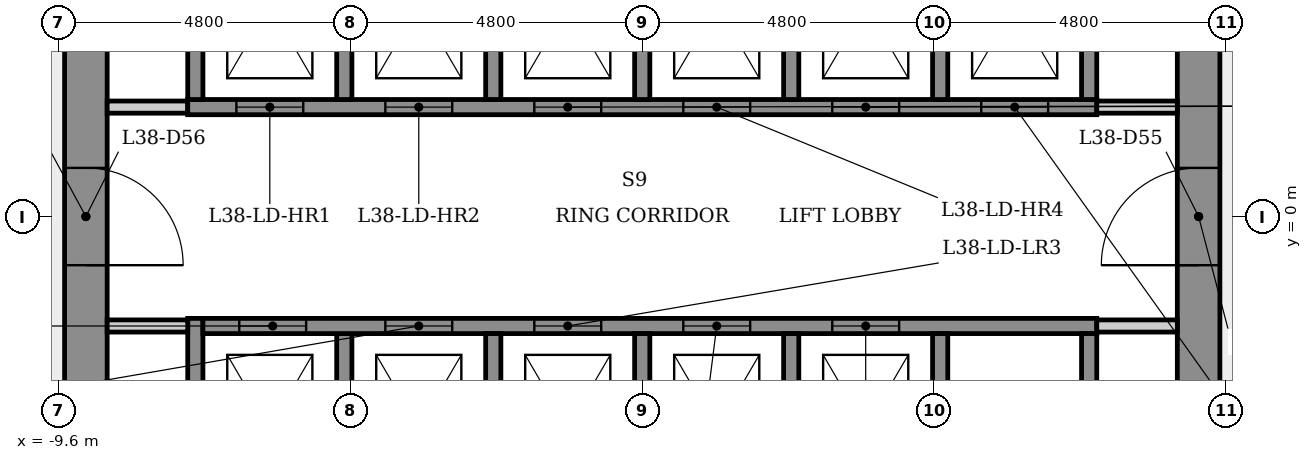
"""IFC4 building model, lengths in metres.
Left out: names, types, materials, properties, quantities, classifications, styles, units other than length and angle.
Written with IfcOpenShell. Run it as: python <this file> out.ifc"""

import sys

from ifc_helpers import new_model, si_unit, direction, frame, frame_2d, origin, place, context, subcontext, project, spatial, rectangle, extrude, element, fill, save


model = new_model("IFC4")
c1 = context("Model", 3, precision=1e-05, world=origin(), true_north=direction((0.0, 1.0)))
c2 = subcontext(c1, "Body", "Model", "MODEL_VIEW")
j1 = project(units=[si_unit("LENGTHUNIT", "METRE"), si_unit("PLANEANGLEUNIT", "RADIAN")], contexts=[c1])
p1 = place(None, origin())
s1 = spatial("IfcSite", under=j1, at=p1, CompositionType="ELEMENT")
p2 = place(p1, origin())
s2 = spatial("IfcBuilding", under=s1, at=p2, CompositionType="ELEMENT")
p3 = place(p2, frame((0.0, 0.0, 143.9)))
s3 = spatial("IfcBuildingStorey", under=s2, at=p3, CompositionType="ELEMENT", Elevation=143.9)
p4 = place(p3, frame((9.15, -5.485, 0.0), z_axis=(0.0, 0.0, 1.0), x_axis=(0.0, 1.0, 0.0)))
e1 = element("IfcWall", 1, at=p4, inside=s3, PredefinedType="SHEAR", context=c2, shape_type="SweptSolid", body=[
    extrude(rectangle(XDim=10.97, YDim=0.7, at=frame_2d((5.485, 0.0))), origin(), (0.0, 0.0, 1.0), 4.0),
])
p5 = place(p4, frame((4.685, 0.0, 0.0)))
e2 = element("IfcOpeningElement", 2, at=p5, cuts=e1, PredefinedType="OPENING", context=c2, shape_type="SweptSolid", body=[
    extrude(rectangle(XDim=1.6, YDim=2.1, at=frame_2d((0.8, 1.05))), frame((0.0, 0.36, 0.0), z_axis=(0.0, -1.0, 0.0), x_axis=(1.0, 0.0, 0.0)), (0.0, 0.0, 1.0), 0.72),
])
p6 = place(p3, frame((-9.15, 5.485, 0.0), z_axis=(0.0, 0.0, 1.0), x_axis=(0.0, -1.0, 0.0)))
e3 = element("IfcWall", 3, at=p6, inside=s3, PredefinedType="SHEAR", context=c2, shape_type="SweptSolid", body=[
    extrude(rectangle(XDim=10.97, YDim=0.7, at=frame_2d((5.485, 0.0))), origin(), (0.0, 0.0, 1.0), 4.0),
])
p7 = place(p6, frame((4.685, 0.0, 0.0)))
e4 = element("IfcOpeningElement", 4, at=p7, cuts=e3, PredefinedType="OPENING", context=c2, shape_type="SweptSolid", body=[
    extrude(rectangle(XDim=1.6, YDim=2.1, at=frame_2d((0.8, 1.05))), frame((0.0, 0.36, 0.0), z_axis=(0.0, -1.0, 0.0), x_axis=(1.0, 0.0, 0.0)), (0.0, 0.0, 1.0), 0.72),
])
p8 = place(p3, frame((-8.8, 1.8, 0.0), z_axis=(0.0, 0.0, 1.0), x_axis=(1.0, 0.0, 0.0)))
e5 = element("IfcWall", 5, at=p8, inside=s3, PredefinedType="PARTITIONING", context=c2, shape_type="SweptSolid", body=[
    extrude(rectangle(XDim=1.325, YDim=0.2, at=frame_2d((0.663, 0.0))), origin(), (0.0, 0.0, 1.0), 3.6),
])
p9 = place(p3, frame((-7.475, 1.8, 0.0), z_axis=(0.0, 0.0, 1.0), x_axis=(1.0, 0.0, 0.0)))
e6 = element("IfcWall", 6, at=p9, inside=s3, PredefinedType="SHEAR", context=c2, shape_type="SweptSolid", body=[
    extrude(rectangle(XDim=14.95, YDim=0.25, at=frame_2d((7.475, 0.0))), origin(), (0.0, 0.0, 1.0), 3.6),
])
p10 = place(p9, frame((0.8, 0.0, 0.0)))
e7 = element("IfcOpeningElement", 7, at=p10, cuts=e6, PredefinedType="OPENING", context=c2, shape_type="SweptSolid", body=[
    extrude(rectangle(XDim=1.1, YDim=2.1, at=frame_2d((0.55, 1.05))), frame((0.0, 0.135, 0.0), z_axis=(0.0, -1.0, 0.0), x_axis=(1.0, 0.0, 0.0)), (0.0, 0.0, 1.0), 0.27),
])
p11 = place(p9, frame((3.25, 0.0, 0.0)))
e8 = element("IfcOpeningElement", 8, at=p11, cuts=e6, PredefinedType="OPENING", context=c2, shape_type="SweptSolid", body=[
    extrude(rectangle(XDim=1.1, YDim=2.1, at=frame_2d((0.55, 1.05))), frame((0.0, 0.135, 0.0), z_axis=(0.0, -1.0, 0.0), x_axis=(1.0, 0.0, 0.0)), (0.0, 0.0, 1.0), 0.27),
])
p12 = place(p9, frame((5.7, 0.0, 0.0)))
e9 = element("IfcOpeningElement", 9, at=p12, cuts=e6, PredefinedType="OPENING", context=c2, shape_type="SweptSolid", body=[
    extrude(rectangle(XDim=1.1, YDim=2.1, at=frame_2d((0.55, 1.05))), frame((0.0, 0.135, 0.0), z_axis=(0.0, -1.0, 0.0), x_axis=(1.0, 0.0, 0.0)), (0.0, 0.0, 1.0), 0.27),
])
p13 = place(p9, frame((8.15, 0.0, 0.0)))
e10 = element("IfcOpeningElement", 10, at=p13, cuts=e6, PredefinedType="OPENING", context=c2, shape_type="SweptSolid", body=[
    extrude(rectangle(XDim=1.1, YDim=2.1, at=frame_2d((0.55, 1.05))), frame((0.0, 0.135, 0.0), z_axis=(0.0, -1.0, 0.0), x_axis=(1.0, 0.0, 0.0)), (0.0, 0.0, 1.0), 0.27),
])
p14 = place(p9, frame((10.6, 0.0, 0.0)))
e11 = element("IfcOpeningElement", 11, at=p14, cuts=e6, PredefinedType="OPENING", context=c2, shape_type="SweptSolid", body=[
    extrude(rectangle(XDim=1.1, YDim=2.1, at=frame_2d((0.55, 1.05))), frame((0.0, 0.135, 0.0), z_axis=(0.0, -1.0, 0.0), x_axis=(1.0, 0.0, 0.0)), (0.0, 0.0, 1.0), 0.27),
])
p15 = place(p9, frame((13.05, 0.0, 0.0)))
e12 = element("IfcOpeningElement", 12, at=p15, cuts=e6, PredefinedType="OPENING", context=c2, shape_type="SweptSolid", body=[
    extrude(rectangle(XDim=1.1, YDim=2.1, at=frame_2d((0.55, 1.05))), frame((0.0, 0.135, 0.0), z_axis=(0.0, -1.0, 0.0), x_axis=(1.0, 0.0, 0.0)), (0.0, 0.0, 1.0), 0.27),
])
p16 = place(p3, frame((-7.35, -5.846, 0.0), z_axis=(0.0, 0.0, 1.0), x_axis=(0.0, 1.0, 0.0)))
e13 = element("IfcWall", 13, at=p16, inside=s3, PredefinedType="SHEAR", context=c2, shape_type="SweptSolid", body=[
    extrude(rectangle(XDim=4.171, YDim=0.25, at=frame_2d((2.085, 0.0))), origin(), (0.0, 0.0, 1.0), 3.6),
])
p17 = place(p3, frame((-7.35, 1.925, 0.0), z_axis=(0.0, 0.0, 1.0), x_axis=(0.0, 1.0, 0.0)))
e14 = element("IfcWall", 14, at=p17, inside=s3, PredefinedType="SHEAR", context=c2, shape_type="SweptSolid", body=[
    extrude(rectangle(XDim=3.921, YDim=0.25, at=frame_2d((1.96, 0.0))), origin(), (0.0, 0.0, 1.0), 3.6),
])
p18 = place(p3, frame((-7.475, -1.8, 0.0), z_axis=(0.0, 0.0, 1.0), x_axis=(-1.0, 0.0, 0.0)))
e15 = element("IfcWall", 15, at=p18, inside=s3, PredefinedType="PARTITIONING", context=c2, shape_type="SweptSolid", body=[
    extrude(rectangle(XDim=1.325, YDim=0.2, at=frame_2d((0.663, 0.0))), origin(), (0.0, 0.0, 1.0), 3.6),
])
for number, where, z_axis, x_axis in (
    (16, (-4.9, -1.925, 0.0), (0.0, 0.0, 1.0), (0.0, -1.0, 0.0)),
    (17, (-4.9, 5.025, 0.0), (0.0, 0.0, 1.0), (0.0, -1.0, 0.0)),
):
    element("IfcWall", number, at=place(p3, frame(where, z_axis=z_axis, x_axis=x_axis)), inside=s3, PredefinedType="SHEAR", context=c2, shape_type="SweptSolid", body=[
        extrude(rectangle(XDim=3.1, YDim=0.25, at=frame_2d((1.55, 0.0))), origin(), (0.0, 0.0, 1.0), 4.0),
    ])
p19 = place(p3, frame((-7.225, -1.8, 0.0), z_axis=(0.0, 0.0, 1.0), x_axis=(1.0, 0.0, 0.0)))
e18 = element("IfcWall", 18, at=p19, inside=s3, PredefinedType="SHEAR", context=c2, shape_type="SweptSolid", body=[
    extrude(rectangle(XDim=14.7, YDim=0.25, at=frame_2d((7.35, 0.0))), origin(), (0.0, 0.0, 1.0), 3.6),
])
p20 = place(p19, frame((0.597, 0.0, 0.0)))
e19 = element("IfcOpeningElement", 19, at=p20, cuts=e18, PredefinedType="OPENING", context=c2, shape_type="SweptSolid", body=[
    extrude(rectangle(XDim=1.1, YDim=2.1, at=frame_2d((0.55, 1.05))), frame((0.0, 0.135, 0.0), z_axis=(0.0, -1.0, 0.0), x_axis=(1.0, 0.0, 0.0)), (0.0, 0.0, 1.0), 0.27),
])
p21 = place(p19, frame((3.0, 0.0, 0.0)))
e20 = element("IfcOpeningElement", 20, at=p21, cuts=e18, PredefinedType="OPENING", context=c2, shape_type="SweptSolid", body=[
    extrude(rectangle(XDim=1.1, YDim=2.1, at=frame_2d((0.55, 1.05))), frame((0.0, 0.135, 0.0), z_axis=(0.0, -1.0, 0.0), x_axis=(1.0, 0.0, 0.0)), (0.0, 0.0, 1.0), 0.27),
])
p22 = place(p19, frame((5.45, 0.0, 0.0)))
e21 = element("IfcOpeningElement", 21, at=p22, cuts=e18, PredefinedType="OPENING", context=c2, shape_type="SweptSolid", body=[
    extrude(rectangle(XDim=1.1, YDim=2.1, at=frame_2d((0.55, 1.05))), frame((0.0, 0.135, 0.0), z_axis=(0.0, -1.0, 0.0), x_axis=(1.0, 0.0, 0.0)), (0.0, 0.0, 1.0), 0.27),
])
p23 = place(p19, frame((7.9, 0.0, 0.0)))
e22 = element("IfcOpeningElement", 22, at=p23, cuts=e18, PredefinedType="OPENING", context=c2, shape_type="SweptSolid", body=[
    extrude(rectangle(XDim=1.1, YDim=2.1, at=frame_2d((0.55, 1.05))), frame((0.0, 0.135, 0.0), z_axis=(0.0, -1.0, 0.0), x_axis=(1.0, 0.0, 0.0)), (0.0, 0.0, 1.0), 0.27),
])
p24 = place(p19, frame((10.35, 0.0, 0.0)))
e23 = element("IfcOpeningElement", 23, at=p24, cuts=e18, PredefinedType="OPENING", context=c2, shape_type="SweptSolid", body=[
    extrude(rectangle(XDim=1.1, YDim=2.1, at=frame_2d((0.55, 1.05))), frame((0.0, 0.135, 0.0), z_axis=(0.0, -1.0, 0.0), x_axis=(1.0, 0.0, 0.0)), (0.0, 0.0, 1.0), 0.27),
])
for number, where, z_axis, x_axis in (
    (24, (-2.45, -1.925, 0.0), (0.0, 0.0, 1.0), (0.0, -1.0, 0.0)),
    (25, (-2.45, 5.025, 0.0), (0.0, 0.0, 1.0), (0.0, -1.0, 0.0)),
    (26, (0.0, -1.925, 0.0), (0.0, 0.0, 1.0), (0.0, -1.0, 0.0)),
    (27, (0.0, 5.025, 0.0), (0.0, 0.0, 1.0), (0.0, -1.0, 0.0)),
    (28, (2.45, -1.925, 0.0), (0.0, 0.0, 1.0), (0.0, -1.0, 0.0)),
    (29, (2.45, 5.025, 0.0), (0.0, 0.0, 1.0), (0.0, -1.0, 0.0)),
    (30, (4.9, -1.925, 0.0), (0.0, 0.0, 1.0), (0.0, -1.0, 0.0)),
    (31, (4.9, 5.025, 0.0), (0.0, 0.0, 1.0), (0.0, -1.0, 0.0)),
):
    element("IfcWall", number, at=place(p3, frame(where, z_axis=z_axis, x_axis=x_axis)), inside=s3, PredefinedType="SHEAR", context=c2, shape_type="SweptSolid", body=[
        extrude(rectangle(XDim=3.1, YDim=0.25, at=frame_2d((1.55, 0.0))), origin(), (0.0, 0.0, 1.0), 4.0),
    ])
p25 = place(p3, frame((7.475, 1.8, 0.0), z_axis=(0.0, 0.0, 1.0), x_axis=(1.0, 0.0, 0.0)))
e32 = element("IfcWall", 32, at=p25, inside=s3, PredefinedType="PARTITIONING", context=c2, shape_type="SweptSolid", body=[
    extrude(rectangle(XDim=1.325, YDim=0.2, at=frame_2d((0.663, 0.0))), origin(), (0.0, 0.0, 1.0), 3.6),
])
for number, where, z_axis, x_axis in (
    (33, (7.35, -1.925, 0.0), (0.0, 0.0, 1.0), (0.0, -1.0, 0.0)),
    (34, (7.35, 5.025, 0.0), (0.0, 0.0, 1.0), (0.0, -1.0, 0.0)),
):
    element("IfcWall", number, at=place(p3, frame(where, z_axis=z_axis, x_axis=x_axis)), inside=s3, PredefinedType="SHEAR", context=c2, shape_type="SweptSolid", body=[
        extrude(rectangle(XDim=3.1, YDim=0.25, at=frame_2d((1.55, 0.0))), origin(), (0.0, 0.0, 1.0), 4.0),
    ])
p26 = place(p3, frame((8.8, -1.8, 0.0), z_axis=(0.0, 0.0, 1.0), x_axis=(-1.0, 0.0, 0.0)))
e35 = element("IfcWall", 35, at=p26, inside=s3, PredefinedType="PARTITIONING", context=c2, shape_type="SweptSolid", body=[
    extrude(rectangle(XDim=1.325, YDim=0.2, at=frame_2d((0.663, 0.0))), origin(), (0.0, 0.0, 1.0), 3.6),
])
p27 = place(p10, origin())
e36 = element("IfcDoor", 36, at=p27, inside=s3, OperationType="SLIDING_TO_LEFT", PredefinedType="DOOR", context=c2, shape_type="SweptSolid", body=[
    extrude(rectangle(XDim=1.1, YDim=2.1, at=frame_2d((0.55, 1.05))), frame((0.0, 0.025, 0.0), z_axis=(0.0, -1.0, 0.0), x_axis=(1.0, 0.0, 0.0)), (0.0, 0.0, 1.0), 0.05),
])
fill(e7, e36)
p28 = place(p11, origin())
e37 = element("IfcDoor", 37, at=p28, inside=s3, OperationType="SLIDING_TO_LEFT", PredefinedType="DOOR", context=c2, shape_type="SweptSolid", body=[
    extrude(rectangle(XDim=1.1, YDim=2.1, at=frame_2d((0.55, 1.05))), frame((0.0, 0.025, 0.0), z_axis=(0.0, -1.0, 0.0), x_axis=(1.0, 0.0, 0.0)), (0.0, 0.0, 1.0), 0.05),
])
fill(e8, e37)
p29 = place(p12, origin())
e38 = element("IfcDoor", 38, at=p29, inside=s3, OperationType="SLIDING_TO_LEFT", PredefinedType="DOOR", context=c2, shape_type="SweptSolid", body=[
    extrude(rectangle(XDim=1.1, YDim=2.1, at=frame_2d((0.55, 1.05))), frame((0.0, 0.025, 0.0), z_axis=(0.0, -1.0, 0.0), x_axis=(1.0, 0.0, 0.0)), (0.0, 0.0, 1.0), 0.05),
])
fill(e9, e38)
p30 = place(p13, origin())
e39 = element("IfcDoor", 39, at=p30, inside=s3, OperationType="SLIDING_TO_LEFT", PredefinedType="DOOR", context=c2, shape_type="SweptSolid", body=[
    extrude(rectangle(XDim=1.1, YDim=2.1, at=frame_2d((0.55, 1.05))), frame((0.0, 0.025, 0.0), z_axis=(0.0, -1.0, 0.0), x_axis=(1.0, 0.0, 0.0)), (0.0, 0.0, 1.0), 0.05),
])
fill(e10, e39)
p31 = place(p14, origin())
e40 = element("IfcDoor", 40, at=p31, inside=s3, OperationType="SLIDING_TO_LEFT", PredefinedType="DOOR", context=c2, shape_type="SweptSolid", body=[
    extrude(rectangle(XDim=1.1, YDim=2.1, at=frame_2d((0.55, 1.05))), frame((0.0, 0.025, 0.0), z_axis=(0.0, -1.0, 0.0), x_axis=(1.0, 0.0, 0.0)), (0.0, 0.0, 1.0), 0.05),
])
fill(e11, e40)
p32 = place(p15, origin())
e41 = element("IfcDoor", 41, at=p32, inside=s3, OperationType="SLIDING_TO_LEFT", PredefinedType="DOOR", context=c2, shape_type="SweptSolid", body=[
    extrude(rectangle(XDim=1.1, YDim=2.1, at=frame_2d((0.55, 1.05))), frame((0.0, 0.025, 0.0), z_axis=(0.0, -1.0, 0.0), x_axis=(1.0, 0.0, 0.0)), (0.0, 0.0, 1.0), 0.05),
])
fill(e12, e41)
p33 = place(p20, origin())
e42 = element("IfcDoor", 42, at=p33, inside=s3, OperationType="SLIDING_TO_LEFT", PredefinedType="DOOR", context=c2, shape_type="SweptSolid", body=[
    extrude(rectangle(XDim=1.1, YDim=2.1, at=frame_2d((0.55, 1.05))), frame((0.0, 0.025, 0.0), z_axis=(0.0, -1.0, 0.0), x_axis=(1.0, 0.0, 0.0)), (0.0, 0.0, 1.0), 0.05),
])
fill(e19, e42)
p34 = place(p21, origin())
e43 = element("IfcDoor", 43, at=p34, inside=s3, OperationType="SLIDING_TO_LEFT", PredefinedType="DOOR", context=c2, shape_type="SweptSolid", body=[
    extrude(rectangle(XDim=1.1, YDim=2.1, at=frame_2d((0.55, 1.05))), frame((0.0, 0.025, 0.0), z_axis=(0.0, -1.0, 0.0), x_axis=(1.0, 0.0, 0.0)), (0.0, 0.0, 1.0), 0.05),
])
fill(e20, e43)
p35 = place(p22, origin())
e44 = element("IfcDoor", 44, at=p35, inside=s3, OperationType="SLIDING_TO_LEFT", PredefinedType="DOOR", context=c2, shape_type="SweptSolid", body=[
    extrude(rectangle(XDim=1.1, YDim=2.1, at=frame_2d((0.55, 1.05))), frame((0.0, 0.025, 0.0), z_axis=(0.0, -1.0, 0.0), x_axis=(1.0, 0.0, 0.0)), (0.0, 0.0, 1.0), 0.05),
])
fill(e21, e44)
p36 = place(p23, origin())
e45 = element("IfcDoor", 45, at=p36, inside=s3, OperationType="SLIDING_TO_LEFT", PredefinedType="DOOR", context=c2, shape_type="SweptSolid", body=[
    extrude(rectangle(XDim=1.1, YDim=2.1, at=frame_2d((0.55, 1.05))), frame((0.0, 0.025, 0.0), z_axis=(0.0, -1.0, 0.0), x_axis=(1.0, 0.0, 0.0)), (0.0, 0.0, 1.0), 0.05),
])
fill(e22, e45)
p37 = place(p24, origin())
e46 = element("IfcDoor", 46, at=p37, inside=s3, OperationType="SLIDING_TO_LEFT", PredefinedType="DOOR", context=c2, shape_type="SweptSolid", body=[
    extrude(rectangle(XDim=1.1, YDim=2.1, at=frame_2d((0.55, 1.05))), frame((0.0, 0.025, 0.0), z_axis=(0.0, -1.0, 0.0), x_axis=(1.0, 0.0, 0.0)), (0.0, 0.0, 1.0), 0.05),
])
fill(e23, e46)
p38 = place(p5, origin())
e47 = element("IfcDoor", 47, at=p38, inside=s3, OperationType="SINGLE_SWING_LEFT", PredefinedType="DOOR", context=c2, shape_type="SweptSolid", body=[
    extrude(rectangle(XDim=1.6, YDim=2.1, at=frame_2d((0.8, 1.05))), frame((0.0, 0.025, 0.0), z_axis=(0.0, -1.0, 0.0), x_axis=(1.0, 0.0, 0.0)), (0.0, 0.0, 1.0), 0.05),
])
fill(e2, e47)
p39 = place(p7, origin())
e48 = element("IfcDoor", 48, at=p39, inside=s3, OperationType="SINGLE_SWING_RIGHT", PredefinedType="DOOR", context=c2, shape_type="SweptSolid", body=[
    extrude(rectangle(XDim=1.6, YDim=2.1, at=frame_2d((0.8, 1.05))), frame((0.0, 0.025, 0.0), z_axis=(0.0, -1.0, 0.0), x_axis=(1.0, 0.0, 0.0)), (0.0, 0.0, 1.0), 0.05),
])
fill(e4, e48)
save(model, sys.argv[1])
